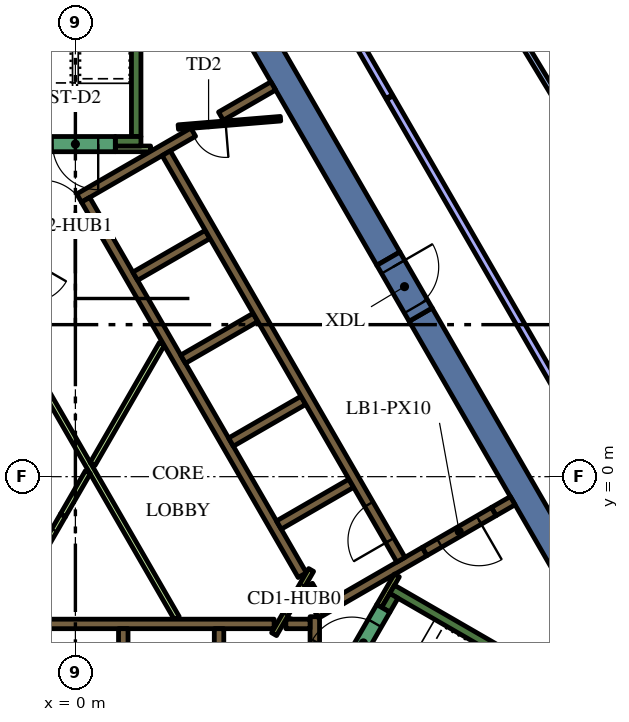
"""IFC4 building model, lengths in metres.
Left out: names, types, materials, properties, quantities, classifications, styles, units other than length and angle.
Written with IfcOpenShell. Run it as: python <this file> out.ifc"""

import sys

from ifc_helpers import new_model, si_unit, direction, frame, frame_2d, origin, place, context, subcontext, project, spatial, rectangle, extrude, element, fill, save


model = new_model("IFC4")
c1 = context("Model", 3, precision=1e-05, world=origin(), true_north=direction((0.0, 1.0)))
c2 = subcontext(c1, "Body", "Model", "MODEL_VIEW")
j1 = project(units=[si_unit("LENGTHUNIT", "METRE"), si_unit("PLANEANGLEUNIT", "RADIAN")], contexts=[c1])
p1 = place(None, origin())
s1 = spatial("IfcSite", under=j1, at=p1, CompositionType="ELEMENT")
p2 = place(p1, origin())
s2 = spatial("IfcBuilding", under=s1, at=p2, CompositionType="ELEMENT")
p3 = place(p2, frame((0.0, 0.0, 201.6)))
s3 = spatial("IfcBuildingStorey", under=s2, at=p3, CompositionType="ELEMENT", Elevation=201.6)
for number, where, z_axis, x_axis in (
    (1, (9.085, 4.264, 0.0), (0.0, 0.0, 1.0), (0.5, -0.866, 0.0)),
    (2, (8.235, 5.736, 0.0), (0.0, 0.0, 1.0), (-0.5, 0.866, 0.0)),
):
    element("IfcWall", number, at=place(p3, frame(where, z_axis=z_axis, x_axis=x_axis)), inside=s3, PredefinedType="SOLIDWALL", context=c2, shape_type="SweptSolid", body=[
        extrude(rectangle(XDim=12.472, YDim=0.7, at=frame_2d((6.236, 0.0))), origin(), (0.0, 0.0, 1.0), 4.2),
    ])
p4 = place(p3, frame((8.334, -2.964, 0.0), z_axis=(0.0, 0.0, 1.0), x_axis=(0.866016039709, -0.500016218704, 0.0)))
e3 = element("IfcWall", 3, at=p4, inside=s3, PredefinedType="SOLIDWALL", context=c2, shape_type="SweptSolid", body=[
    extrude(rectangle(XDim=7.05, YDim=0.25, at=frame_2d((3.525, 0.0))), origin(), (0.0, 0.0, 1.0), 4.2),
])
p5 = place(p3, frame((8.168, -3.503, 0.0), z_axis=(0.0, 0.0, 1.0), x_axis=(0.49972245349, 0.866185586049, 0.0)))
e4 = element("IfcWall", 4, at=p5, inside=s3, PredefinedType="SOLIDWALL", context=c2, shape_type="SweptSolid", body=[
    extrude(rectangle(XDim=0.425, YDim=0.25, at=frame_2d((0.212, 0.0))), origin(), (0.0, 0.0, 1.0), 4.2),
])
p6 = place(p3, frame((1.6, 8.95, 0.0), z_axis=(0.0, 0.0, 1.0), x_axis=(0.0, 1.0, 0.0)))
e5 = element("IfcWall", 5, at=p6, inside=s3, PredefinedType="SOLIDWALL", context=c2, shape_type="SweptSolid", body=[
    extrude(rectangle(XDim=6.8, YDim=0.25, at=frame_2d((3.4, 0.0))), origin(), (0.0, 0.0, 1.0), 4.2),
])
p7 = place(p3, frame((1.05, 8.825, 0.0), z_axis=(0.0, 0.0, 1.0), x_axis=(1.0, 0.0, 0.0)))
e6 = element("IfcWall", 6, at=p7, inside=s3, PredefinedType="SOLIDWALL", context=c2, shape_type="SweptSolid", body=[
    extrude(rectangle(XDim=0.675, YDim=0.25, at=frame_2d((0.337, 0.0))), origin(), (0.0, 0.0, 1.0), 4.2),
])
p8 = place(p3, frame((-5.259, -3.875, 0.0), z_axis=(0.0, 0.0, 1.0), x_axis=(1.0, 0.0, 0.0)))
e7 = element("IfcWall", 7, at=p8, inside=s3, PredefinedType="SOLIDWALL", context=c2, shape_type="SweptSolid", body=[
    extrude(rectangle(XDim=10.489, YDim=0.25, at=frame_2d((5.244, 0.0))), origin(), (0.0, 0.0, 1.0), 4.2),
])
for number, where, z_axis, x_axis in (
    (8, (3.78, -4.0, 0.0), (0.0, 0.0, 1.0), (0.0, -1.0, 0.0)),
    (9, (1.26, -4.0, 0.0), (0.0, 0.0, 1.0), (0.0, -1.0, 0.0)),
):
    element("IfcWall", number, at=place(p3, frame(where, z_axis=z_axis, x_axis=x_axis)), inside=s3, PredefinedType="SOLIDWALL", context=c2, shape_type="SweptSolid", body=[
        extrude(rectangle(XDim=2.2, YDim=0.25, at=frame_2d((1.1, 0.0))), origin(), (0.0, 0.0, 1.0), 4.2),
    ])
p9 = place(p3, frame((6.3, -7.24, 0.0), z_axis=(0.0, 0.0, 1.0), x_axis=(0.0, 1.0, 0.0)))
e10 = element("IfcWall", 10, at=p9, inside=s3, PredefinedType="SOLIDWALL", context=c2, shape_type="SweptSolid", body=[
    extrude(rectangle(XDim=3.556, YDim=0.25, at=frame_2d((1.778, 0.0))), origin(), (0.0, 0.0, 1.0), 4.2),
])
p10 = place(p3, frame((5.538, -3.875, 0.0), z_axis=(0.0, 0.0, 1.0), x_axis=(1.0, 0.0, 0.0)))
e11 = element("IfcWall", 11, at=p10, inside=s3, PredefinedType="SOLIDWALL", context=c2, shape_type="SweptSolid", body=[
    extrude(rectangle(XDim=0.637, YDim=0.25, at=frame_2d((0.318, 0.0))), origin(), (0.0, 0.0, 1.0), 4.2),
])
p11 = place(p3, frame((9.19, -1.969, 0.0), z_axis=(0.0, 0.0, 1.0), x_axis=(-0.866057109641, -0.499945079824, 0.0)))
e12 = element("IfcWall", 12, at=p11, inside=s3, PredefinedType="SOLIDWALL", context=c2, shape_type="SweptSolid", body=[
    extrude(rectangle(XDim=3.291, YDim=0.25, at=frame_2d((1.646, 0.0))), origin(), (0.0, 0.0, 1.0), 4.2),
])
p12 = place(p3, frame((6.13, -2.867, 0.0), z_axis=(0.0, 0.0, 1.0), x_axis=(0.500160776593, -0.865932559475, 0.0)))
e13 = element("IfcWall", 13, at=p12, inside=s3, PredefinedType="SOLIDWALL", context=c2, shape_type="SweptSolid", body=[
    extrude(rectangle(XDim=0.627, YDim=0.25, at=frame_2d((0.313, 0.0))), origin(), (0.0, 0.0, 1.0), 4.2),
])
p13 = place(p3, frame((11.507, -0.631, 0.0), z_axis=(0.0, 0.0, 1.0), x_axis=(-0.866093731455, -0.499881634324, 0.0)))
e14 = element("IfcWall", 14, at=p13, inside=s3, PredefinedType="SOLIDWALL", context=c2, shape_type="SweptSolid", body=[
    extrude(rectangle(XDim=0.575, YDim=0.25, at=frame_2d((0.288, 0.0))), origin(), (0.0, 0.0, 1.0), 4.2),
])
p14 = place(p3, frame((3.1, 9.064, 0.0), z_axis=(0.0, 0.0, 1.0), x_axis=(-0.866033137035, -0.499986605379, 0.0)))
e15 = element("IfcWall", 15, at=p14, inside=s3, PredefinedType="SOLIDWALL", context=c2, shape_type="SweptSolid", body=[
    extrude(rectangle(XDim=3.467, YDim=0.25, at=frame_2d((1.733, 0.0))), origin(), (0.0, 0.0, 1.0), 4.2),
])
p15 = place(p3, frame((0.268, 7.285, 0.0), z_axis=(0.0, 0.0, 1.0), x_axis=(0.500098681536, -0.865968422476, 0.0)))
e16 = element("IfcWall", 16, at=p15, inside=s3, PredefinedType="SOLIDWALL", context=c2, shape_type="SweptSolid", body=[
    extrude(rectangle(XDim=0.636, YDim=0.25, at=frame_2d((0.318, 0.0))), origin(), (0.0, 0.0, 1.0), 4.2),
])
p16 = place(p3, frame((5.97, -2.591, 0.0), z_axis=(0.0, 0.0, 1.0), x_axis=(-0.499994469932, 0.866028596547, 0.0)))
e17 = element("IfcWall", 17, at=p16, inside=s3, PredefinedType="SOLIDWALL", context=c2, shape_type="SweptSolid", body=[
    extrude(rectangle(XDim=10.488, YDim=0.25, at=frame_2d((5.244, 0.0))), origin(), (0.0, 0.0, 1.0), 4.2),
])
p17 = place(p3, frame((1.574, 5.274, 0.0), z_axis=(0.0, 0.0, 1.0), x_axis=(0.866028486751, 0.499994660107, 0.0)))
e18 = element("IfcWall", 18, at=p17, inside=s3, PredefinedType="SOLIDWALL", context=c2, shape_type="SweptSolid", body=[
    extrude(rectangle(XDim=2.2, YDim=0.25, at=frame_2d((1.1, 0.0))), origin(), (0.0, 0.0, 1.0), 4.2),
])
for number, where, z_axis, x_axis in (
    (19, (2.834, 3.091, 0.0), (0.0, 0.0, 1.0), (0.866, 0.5, 0.0)),
    (20, (4.094, 0.909, 0.0), (0.0, 0.0, 1.0), (0.866, 0.5, 0.0)),
    (21, (5.354, -1.274, 0.0), (0.0, 0.0, 1.0), (0.866, 0.5, 0.0)),
):
    element("IfcWall", number, at=place(p3, frame(where, z_axis=z_axis, x_axis=x_axis)), inside=s3, PredefinedType="SOLIDWALL", context=c2, shape_type="SweptSolid", body=[
        extrude(rectangle(XDim=2.2, YDim=0.25, at=frame_2d((1.1, 0.0))), origin(), (0.0, 0.0, 1.0), 4.2),
    ])
p18 = place(p3, frame((3.83, 9.486, 0.0), z_axis=(0.0, 0.0, 1.0), x_axis=(0.865986202621, 0.500067892261, 0.0)))
e22 = element("IfcWall", 22, at=p18, inside=s3, PredefinedType="SOLIDWALL", context=c2, shape_type="SweptSolid", body=[
    extrude(rectangle(XDim=1.591, YDim=0.25, at=frame_2d((0.795, 0.0))), origin(), (0.0, 0.0, 1.0), 4.2),
])
p19 = place(p3, frame((1.05, 8.625, 0.0), z_axis=(0.0, 0.0, 1.0), x_axis=(1.0, 0.0, 0.0)))
e23 = element("IfcWall", 23, at=p19, inside=s3, PredefinedType="PARTITIONING", context=c2, shape_type="SweptSolid", body=[
    extrude(rectangle(XDim=0.929, YDim=0.15, at=frame_2d((0.464, 0.0))), origin(), (0.0, 0.0, 1.0), 3.45),
])
p20 = place(p3, frame((8.459, -2.599, 0.0), z_axis=(0.0, 0.0, 1.0), x_axis=(-0.500041054325, -0.866001699761, 0.0)))
e24 = element("IfcWall", 24, at=p20, inside=s3, PredefinedType="PARTITIONING", context=c2, shape_type="SweptSolid", body=[
    extrude(rectangle(XDim=0.929, YDim=0.15, at=frame_2d((0.464, 0.0))), origin(), (0.0, 0.0, 1.0), 4.2),
])
p21 = place(p3, frame((-1.887, 4.168, 0.0), z_axis=(0.0, 0.0, 1.0), x_axis=(0.499997069472, -0.866027095719, 0.0)))
e25 = element("IfcWall", 25, at=p21, inside=s3, PredefinedType="PARTITIONING", context=c2, shape_type="SweptSolid", body=[
    extrude(rectangle(XDim=9.106, YDim=0.15, at=frame_2d((4.553, 0.0))), origin(), (0.0, 0.0, 1.0), 3.45),
])
p22 = place(p3, frame((-0.329, -1.021, 0.0), z_axis=(0.0, 0.0, 1.0), x_axis=(0.500033191285, 0.866006239939, 0.0)))
e26 = element("IfcWall", 26, at=p22, inside=s3, PredefinedType="PARTITIONING", context=c2, shape_type="SweptSolid", body=[
    extrude(rectangle(XDim=1.315, YDim=0.15, at=frame_2d((0.657, 0.0))), origin(), (0.0, 0.0, 1.0), 3.45),
])
p23 = place(p3, frame((2.277, 3.493, 0.0), z_axis=(0.0, 0.0, 1.0), x_axis=(-0.499994550825, -0.866028549844, 0.0)))
e27 = element("IfcWall", 27, at=p23, inside=s3, PredefinedType="PARTITIONING", context=c2, shape_type="SweptSolid", body=[
    extrude(rectangle(XDim=3.65, YDim=0.15, at=frame_2d((1.825, 0.0))), origin(), (0.0, 0.0, 1.0), 3.45),
])
p24 = place(p3, frame((8.565, -2.185, 0.0), z_axis=(0.0, 0.0, 1.0), x_axis=(-0.499997954832, 0.866026584559, 0.0)))
e28 = element("IfcWall", 28, at=p24, inside=s3, PredefinedType="SOLIDWALL", context=c2, shape_type="SweptSolid", body=[
    extrude(rectangle(XDim=12.35, YDim=0.25, at=frame_2d((6.175, 0.0))), origin(), (0.0, 0.0, 1.0), 4.2),
])
p25 = place(p24, frame((0.585, 0.0, 0.0)))
e29 = element("IfcOpeningElement", 29, at=p25, cuts=e28, PredefinedType="OPENING", context=c2, shape_type="SweptSolid", body=[
    extrude(rectangle(XDim=1.1, YDim=2.1, at=frame_2d((0.55, 1.05))), frame((0.0, 0.135, 0.0), z_axis=(0.0, -1.0, 0.0), x_axis=(1.0, 0.0, 0.0)), (0.0, 0.0, 1.0), 0.27),
])
p26 = place(p3, frame((7.053, -5.284, 0.0), z_axis=(0.0, 0.0, 1.0), x_axis=(0.500078061341, 0.865980330357, 0.0)))
e30 = element("IfcWall", 30, at=p26, inside=s3, PredefinedType="SOLIDWALL", context=c2, shape_type="SweptSolid", body=[
    extrude(rectangle(XDim=2.1, YDim=0.4, at=frame_2d((1.05, 0.0))), origin(), (0.0, 0.0, 1.0), 4.2),
])
p27 = place(p26, frame((0.45, 0.0, 0.0)))
e31 = element("IfcOpeningElement", 31, at=p27, cuts=e30, PredefinedType="OPENING", context=c2, shape_type="SweptSolid", body=[
    extrude(rectangle(XDim=1.2, YDim=2.1, at=frame_2d((0.6, 1.05))), frame((0.0, 0.21, 0.0), z_axis=(0.0, -1.0, 0.0), x_axis=(1.0, 0.0, 0.0)), (0.0, 0.0, 1.0), 0.42),
])
p28 = place(p3, frame((1.05, 8.75, 0.0), z_axis=(0.0, 0.0, 1.0), x_axis=(-1.0, 0.0, 0.0)))
e32 = element("IfcWall", 32, at=p28, inside=s3, PredefinedType="SOLIDWALL", context=c2, shape_type="SweptSolid", body=[
    extrude(rectangle(XDim=2.1, YDim=0.4, at=frame_2d((1.05, 0.0))), origin(), (0.0, 0.0, 1.0), 4.2),
])
p29 = place(p28, frame((0.45, 0.0, 0.0)))
e33 = element("IfcOpeningElement", 33, at=p29, cuts=e32, PredefinedType="OPENING", context=c2, shape_type="SweptSolid", body=[
    extrude(rectangle(XDim=1.2, YDim=2.1, at=frame_2d((0.6, 1.05))), frame((0.0, 0.21, 0.0), z_axis=(0.0, -1.0, 0.0), x_axis=(1.0, 0.0, 0.0)), (0.0, 0.0, 1.0), 0.42),
])
p30 = place(p3, frame((5.398, 9.419, 0.0), z_axis=(0.0, 0.0, 1.0), x_axis=(-0.996653416376, -0.081743303248, 0.0)))
e34 = element("IfcWall", 34, at=p30, inside=s3, PredefinedType="PARTITIONING", context=c2, shape_type="SweptSolid", body=[
    extrude(rectangle(XDim=2.7, YDim=0.12, at=frame_2d((1.35, 0.0))), origin(), (0.0, 0.0, 1.0), 3.45),
])
p31 = place(p30, frame((1.45, 0.0, 0.0)))
e35 = element("IfcOpeningElement", 35, at=p31, cuts=e34, PredefinedType="OPENING", context=c2, shape_type="SweptSolid", body=[
    extrude(rectangle(XDim=0.9, YDim=2.1, at=frame_2d((0.45, 1.05))), frame((0.0, 0.07, 0.0), z_axis=(0.0, -1.0, 0.0), x_axis=(1.0, 0.0, 0.0)), (0.0, 0.0, 1.0), 0.14),
])
p32 = place(p3, frame((6.203, -2.456, 0.0), z_axis=(0.0, 0.0, 1.0), x_axis=(-0.500043961785, -0.866000020948, 0.0)))
e36 = element("IfcWall", 36, at=p32, inside=s3, PredefinedType="PARTITIONING", context=c2, shape_type="SweptSolid", body=[
    extrude(rectangle(XDim=1.95, YDim=0.15, at=frame_2d((0.975, 0.0))), origin(), (0.0, 0.0, 1.0), 4.2),
])
p33 = place(p32, frame((0.45, 0.0, 0.0)))
e37 = element("IfcOpeningElement", 37, at=p33, cuts=e36, PredefinedType="OPENING", context=c2, shape_type="SweptSolid", body=[
    extrude(rectangle(XDim=0.9, YDim=2.1, at=frame_2d((0.45, 1.05))), frame((0.0, 0.085, 0.0), z_axis=(0.0, -1.0, 0.0), x_axis=(1.0, 0.0, 0.0)), (0.0, 0.0, 1.0), 0.17),
])
p34 = place(p3, frame((-1.303, 6.6, 0.0), z_axis=(0.0, 0.0, 1.0), x_axis=(1.0, 0.0, 0.0)))
e38 = element("IfcWall", 38, at=p34, inside=s3, PredefinedType="PARTITIONING", context=c2, shape_type="SweptSolid", body=[
    extrude(rectangle(XDim=2.1, YDim=0.15, at=frame_2d((1.05, 0.0))), origin(), (0.0, 0.0, 1.0), 4.2),
])
p35 = place(p34, frame((0.45, 0.0, 0.0)))
e39 = element("IfcOpeningElement", 39, at=p35, cuts=e38, PredefinedType="OPENING", context=c2, shape_type="SweptSolid", body=[
    extrude(rectangle(XDim=1.2, YDim=2.1, at=frame_2d((0.6, 1.05))), frame((0.0, 0.085, 0.0), z_axis=(0.0, -1.0, 0.0), x_axis=(1.0, 0.0, 0.0)), (0.0, 0.0, 1.0), 0.17),
])
p36 = place(p3, frame((11.009, -0.919, 0.0), z_axis=(0.0, 0.0, 1.0), x_axis=(-0.866059744384, -0.49994051562, 0.0)))
e40 = element("IfcWall", 40, at=p36, inside=s3, PredefinedType="SOLIDWALL", context=c2, shape_type="SweptSolid", body=[
    extrude(rectangle(XDim=2.1, YDim=0.25, at=frame_2d((1.05, 0.0))), origin(), (0.0, 0.0, 1.0), 4.2),
])
p37 = place(p36, frame((0.45, 0.0, 0.0)))
e41 = element("IfcOpeningElement", 41, at=p37, cuts=e40, PredefinedType="OPENING", context=c2, shape_type="SweptSolid", body=[
    extrude(rectangle(XDim=1.2, YDim=2.1, at=frame_2d((0.6, 1.05))), frame((0.0, 0.135, 0.0), z_axis=(0.0, -1.0, 0.0), x_axis=(1.0, 0.0, 0.0)), (0.0, 0.0, 1.0), 0.27),
])
p38 = place(p3, frame((8.235, 5.736, 0.0), z_axis=(0.0, 0.0, 1.0), x_axis=(0.499954529098, -0.86605165483, 0.0)))
e42 = element("IfcWall", 42, at=p38, inside=s3, PredefinedType="SOLIDWALL", context=c2, shape_type="SweptSolid", body=[
    extrude(rectangle(XDim=1.7, YDim=0.7, at=frame_2d((0.85, 0.0))), origin(), (0.0, 0.0, 1.0), 4.2),
])
p39 = place(p38, frame((0.25, 0.0, 0.0)))
e43 = element("IfcOpeningElement", 43, at=p39, cuts=e42, PredefinedType="OPENING", context=c2, shape_type="SweptSolid", body=[
    extrude(rectangle(XDim=1.2, YDim=2.1, at=frame_2d((0.6, 1.05))), frame((0.0, 0.36, 0.0), z_axis=(0.0, -1.0, 0.0), x_axis=(1.0, 0.0, 0.0)), (0.0, 0.0, 1.0), 0.72),
])
p40 = place(p3, frame((-1.229, -2.579, 0.0), z_axis=(0.0, 0.0, 1.0), x_axis=(0.500062916607, 0.865989075817, 0.0)))
e44 = element("IfcWall", 44, at=p40, inside=s3, PredefinedType="PARTITIONING", context=c2, shape_type="SweptSolid", body=[
    extrude(rectangle(XDim=1.8, YDim=0.15, at=frame_2d((0.9, 0.0))), origin(), (0.0, 0.0, 1.0), 3.45),
])
p41 = place(p40, frame((0.45, 0.0, 0.0)))
e45 = element("IfcOpeningElement", 45, at=p41, cuts=e44, PredefinedType="OPENING", context=c2, shape_type="SweptSolid", body=[
    extrude(rectangle(XDim=0.9, YDim=2.1, at=frame_2d((0.45, 1.05))), frame((0.0, 0.085, 0.0), z_axis=(0.0, -1.0, 0.0), x_axis=(1.0, 0.0, 0.0)), (0.0, 0.0, 1.0), 0.17),
])
p42 = place(p3, frame((13.737, 8.178, 0.0), z_axis=(0.0, 0.0, 1.0), x_axis=(-0.517884383874, 0.855450620983, 0.0)))
e46 = element("IfcWall", 46, at=p42, inside=s3, PredefinedType="PARTITIONING", context=c2, shape_type="SweptSolid", body=[
    extrude(rectangle(XDim=6.043, YDim=0.15, at=frame_2d((3.021, 0.0))), origin(), (0.0, 0.0, 1.0), 3.45),
])
p43 = place(p3, frame((12.772, 2.178, 0.0), z_axis=(0.0, 0.0, 1.0), x_axis=(-0.5000018851, 0.866024315419, 0.0)))
e47 = element("IfcWall", 47, at=p43, inside=s3, PredefinedType="PARTITIONING", context=c2, shape_type="SweptSolid", body=[
    extrude(rectangle(XDim=9.0, YDim=0.2, at=frame_2d((4.5, 0.0))), origin(), (0.0, 0.0, 1.0), 3.45),
])
p44 = place(p3, frame((8.257, 9.998, 0.0), z_axis=(0.0, 0.0, 1.0), x_axis=(-0.499998405424, 0.866026324412, 0.0)))
e48 = element("IfcWall", 48, at=p44, inside=s3, PredefinedType="PARTITIONING", context=c2, shape_type="SweptSolid", body=[
    extrude(rectangle(XDim=9.267, YDim=0.2, at=frame_2d((4.633, 0.0))), origin(), (0.0, 0.0, 1.0), 3.45),
])
p45 = place(p25, origin())
e49 = element("IfcDoor", 49, at=p45, inside=s3, OperationType="DOUBLE_DOOR_SLIDING", PredefinedType="DOOR", context=c2, shape_type="SweptSolid", body=[
    extrude(rectangle(XDim=1.1, YDim=2.1, at=frame_2d((0.55, 1.05))), frame((0.0, 0.025, 0.0), z_axis=(0.0, -1.0, 0.0), x_axis=(1.0, 0.0, 0.0)), (0.0, 0.0, 1.0), 0.05),
])
fill(e29, e49)
p46 = place(p27, origin())
e50 = element("IfcDoor", 50, at=p46, inside=s3, OperationType="SINGLE_SWING_LEFT", PredefinedType="DOOR", context=c2, shape_type="SweptSolid", body=[
    extrude(rectangle(XDim=1.2, YDim=2.1, at=frame_2d((0.6, 1.05))), frame((0.0, 0.025, 0.0), z_axis=(0.0, -1.0, 0.0), x_axis=(1.0, 0.0, 0.0)), (0.0, 0.0, 1.0), 0.05),
])
fill(e31, e50)
p47 = place(p29, origin())
e51 = element("IfcDoor", 51, at=p47, inside=s3, OperationType="SINGLE_SWING_LEFT", PredefinedType="DOOR", context=c2, shape_type="SweptSolid", body=[
    extrude(rectangle(XDim=1.2, YDim=2.1, at=frame_2d((0.6, 1.05))), frame((0.0, 0.025, 0.0), z_axis=(0.0, -1.0, 0.0), x_axis=(1.0, 0.0, 0.0)), (0.0, 0.0, 1.0), 0.05),
])
fill(e33, e51)
p48 = place(p31, origin())
e52 = element("IfcDoor", 52, at=p48, inside=s3, OperationType="SINGLE_SWING_LEFT", PredefinedType="DOOR", context=c2, shape_type="SweptSolid", body=[
    extrude(rectangle(XDim=0.9, YDim=2.1, at=frame_2d((0.45, 1.05))), frame((0.0, 0.025, 0.0), z_axis=(0.0, -1.0, 0.0), x_axis=(1.0, 0.0, 0.0)), (0.0, 0.0, 1.0), 0.05),
])
fill(e35, e52)
p49 = place(p33, origin())
e53 = element("IfcDoor", 53, at=p49, inside=s3, OperationType="SINGLE_SWING_LEFT", PredefinedType="DOOR", context=c2, shape_type="SweptSolid", body=[
    extrude(rectangle(XDim=0.9, YDim=2.1, at=frame_2d((0.45, 1.05))), frame((0.0, 0.025, 0.0), z_axis=(0.0, -1.0, 0.0), x_axis=(1.0, 0.0, 0.0)), (0.0, 0.0, 1.0), 0.05),
])
fill(e37, e53)
p50 = place(p35, origin())
e54 = element("IfcDoor", 54, at=p50, inside=s3, OperationType="SINGLE_SWING_LEFT", PredefinedType="DOOR", context=c2, shape_type="SweptSolid", body=[
    extrude(rectangle(XDim=1.2, YDim=2.1, at=frame_2d((0.6, 1.05))), frame((0.0, 0.025, 0.0), z_axis=(0.0, -1.0, 0.0), x_axis=(1.0, 0.0, 0.0)), (0.0, 0.0, 1.0), 0.05),
])
fill(e39, e54)
p51 = place(p37, origin())
e55 = element("IfcDoor", 55, at=p51, inside=s3, OperationType="SINGLE_SWING_LEFT", PredefinedType="DOOR", context=c2, shape_type="SweptSolid", body=[
    extrude(rectangle(XDim=1.2, YDim=2.1, at=frame_2d((0.6, 1.05))), frame((0.0, 0.025, 0.0), z_axis=(0.0, -1.0, 0.0), x_axis=(1.0, 0.0, 0.0)), (0.0, 0.0, 1.0), 0.05),
])
fill(e41, e55)
p52 = place(p39, origin())
e56 = element("IfcDoor", 56, at=p52, inside=s3, OperationType="SINGLE_SWING_LEFT", PredefinedType="DOOR", context=c2, shape_type="SweptSolid", body=[
    extrude(rectangle(XDim=1.2, YDim=2.1, at=frame_2d((0.6, 1.05))), frame((0.0, 0.025, 0.0), z_axis=(0.0, -1.0, 0.0), x_axis=(1.0, 0.0, 0.0)), (0.0, 0.0, 1.0), 0.05),
])
fill(e43, e56)
p53 = place(p41, origin())
e57 = element("IfcDoor", 57, at=p53, inside=s3, OperationType="SINGLE_SWING_LEFT", PredefinedType="DOOR", context=c2, shape_type="SweptSolid", body=[
    extrude(rectangle(XDim=0.9, YDim=2.1, at=frame_2d((0.45, 1.05))), frame((0.0, 0.025, 0.0), z_axis=(0.0, -1.0, 0.0), x_axis=(1.0, 0.0, 0.0)), (0.0, 0.0, 1.0), 0.05),
])
fill(e45, e57)
save(model, sys.argv[1])
